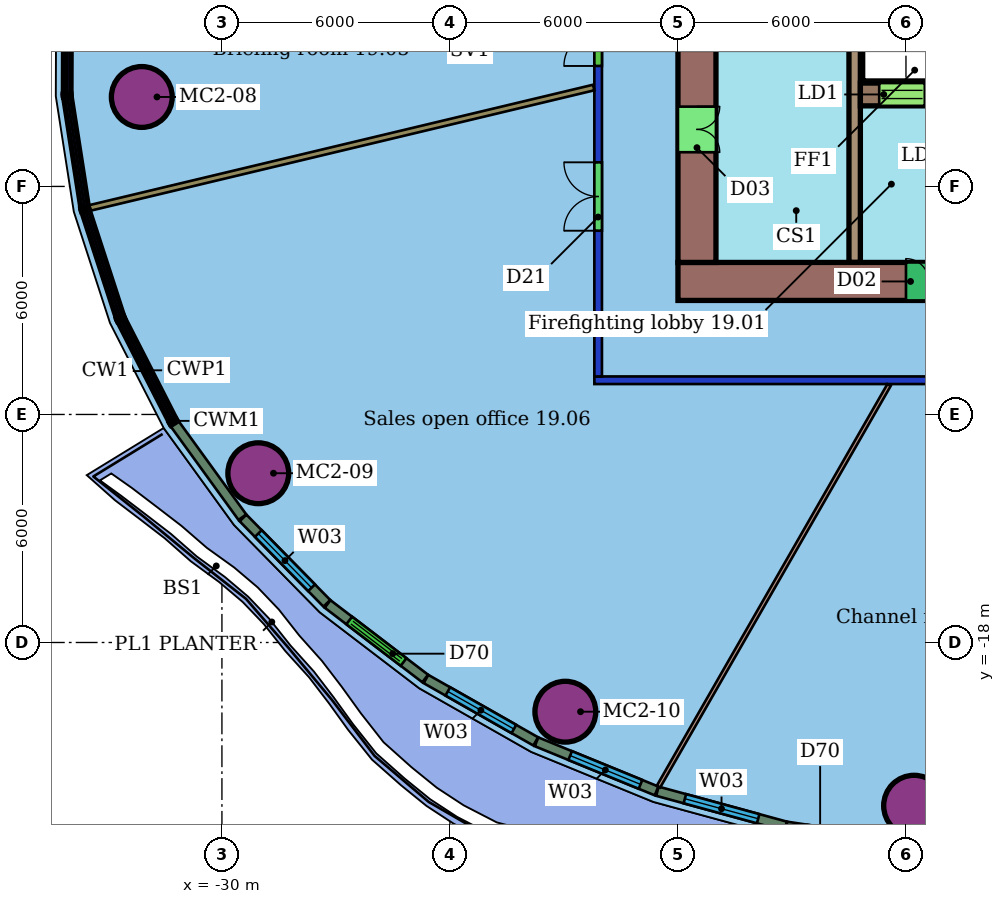
"""IFC4 building model, lengths in metres.
Left out: names, types, materials, properties, quantities, classifications, styles, units other than length and angle.
Written with IfcOpenShell. Run it as: python <this file> out.ifc"""

import sys

from ifc_helpers import new_model, si_unit, direction, frame, frame_2d, origin, origin_2d, place, context, subcontext, project, spatial, rectangle, hollow_circle, extrude, element, fill, save


model = new_model("IFC4")
c1 = context("Model", 3, precision=1e-05, world=origin(), true_north=direction((0.0, 1.0)))
c2 = subcontext(c1, "Body", "Model", "MODEL_VIEW")
j1 = project(units=[si_unit("LENGTHUNIT", "METRE"), si_unit("PLANEANGLEUNIT", "RADIAN")], contexts=[c1])
p1 = place(None, origin())
s1 = spatial("IfcSite", under=j1, at=p1, CompositionType="ELEMENT")
p2 = place(p1, origin())
s2 = spatial("IfcBuilding", under=s1, at=p2, CompositionType="ELEMENT")
p3 = place(p2, frame((0.0, 0.0, 88.6)))
s3 = spatial("IfcBuildingStorey", under=s2, at=p3, CompositionType="ELEMENT", Elevation=88.6)
for number, where, z_axis, x_axis in (
    (1, (-32.109, -3.646, 0.0), (0.0, 0.0, 1.0), (1.0, 0.0, 0.0)),
    (2, (-29.043, -13.547, 0.0), (0.0, 0.0, 1.0), (1.0, 0.0, 0.0)),
    (3, (-20.963, -19.821, 0.0), (0.0, 0.0, 1.0), (1.0, 0.0, 0.0)),
    (4, (-11.787, -22.294, 0.0), (0.0, 0.0, 1.0), (1.0, 0.0, 0.0)),
):
    element("IfcColumn", number, at=place(p3, frame(where, z_axis=z_axis, x_axis=x_axis)), inside=s3, PredefinedType="COLUMN", context=c2, shape_type="SweptSolid", body=[
        extrude(hollow_circle(Radius=0.8, WallThickness=0.055, at=origin_2d()), origin(), (0.0, 0.0, 1.0), 3.45),
    ])
p4 = place(p3, frame((8.2, -11.1, 0.0), z_axis=(0.0, 0.0, 1.0), x_axis=(-1.0, 0.0, 0.0)))
e5 = element("IfcWall", 5, at=p4, inside=s3, PredefinedType="PARTITIONING", context=c2, shape_type="SweptSolid", body=[
    extrude(rectangle(XDim=28.4, YDim=0.2, at=frame_2d((14.2, 0.0))), origin(), (0.0, 0.0, 1.0), 3.0),
])
p5 = place(p4, frame((17.581, 0.0, 0.0)))
e6 = element("IfcOpeningElement", 6, at=p5, cuts=e5, PredefinedType="OPENING", context=c2, shape_type="SweptSolid", body=[
    extrude(rectangle(XDim=1.0, YDim=2.1, at=frame_2d((0.5, 1.05))), frame((0.0, 0.11, 0.0), z_axis=(0.0, -1.0, 0.0), x_axis=(1.0, 0.0, 0.0)), (0.0, 0.0, 1.0), 0.22),
])
p6 = place(p4, frame((6.998, 0.0, 0.0)))
e7 = element("IfcOpeningElement", 7, at=p6, cuts=e5, PredefinedType="OPENING", context=c2, shape_type="SweptSolid", body=[
    extrude(rectangle(XDim=1.5, YDim=2.1, at=frame_2d((0.75, 1.05))), frame((0.0, 0.11, 0.0), z_axis=(0.0, -1.0, 0.0), x_axis=(1.0, 0.0, 0.0)), (0.0, 0.0, 1.0), 0.22),
])
p7 = place(p4, frame((2.403, 0.0, 0.0)))
e8 = element("IfcOpeningElement", 8, at=p7, cuts=e5, PredefinedType="OPENING", context=c2, shape_type="SweptSolid", body=[
    extrude(rectangle(XDim=1.0, YDim=2.4, at=frame_2d((0.5, 1.2))), frame((0.0, 0.11, 0.0), z_axis=(0.0, -1.0, 0.0), x_axis=(1.0, 0.0, 0.0)), (0.0, 0.0, 1.0), 0.22),
])
p8 = place(p3, frame((-20.1, -11.0, 0.0), z_axis=(0.0, 0.0, 1.0), x_axis=(0.0, 1.0, 0.0)))
e9 = element("IfcWall", 9, at=p8, inside=s3, PredefinedType="PARTITIONING", context=c2, shape_type="SweptSolid", body=[
    extrude(rectangle(XDim=22.0, YDim=0.2, at=frame_2d((11.0, 0.0))), origin(), (0.0, 0.0, 1.0), 3.0),
])
p9 = place(p8, frame((14.9, 0.0, 0.0)))
e10 = element("IfcOpeningElement", 10, at=p9, cuts=e9, PredefinedType="OPENING", context=c2, shape_type="SweptSolid", body=[
    extrude(rectangle(XDim=0.9, YDim=2.1, at=frame_2d((0.45, 1.05))), frame((0.0, 0.11, 0.0), z_axis=(0.0, -1.0, 0.0), x_axis=(1.0, 0.0, 0.0)), (0.0, 0.0, 1.0), 0.22),
])
p10 = place(p8, frame((8.17, 0.0, 0.0)))
e11 = element("IfcOpeningElement", 11, at=p10, cuts=e9, PredefinedType="OPENING", context=c2, shape_type="SweptSolid", body=[
    extrude(rectangle(XDim=1.8, YDim=2.4, at=frame_2d((0.9, 1.2))), frame((0.0, 0.11, 0.0), z_axis=(0.0, -1.0, 0.0), x_axis=(1.0, 0.0, 0.0)), (0.0, 0.0, 1.0), 0.22),
])
p11 = place(p8, frame((3.835, 0.0, 0.0)))
e12 = element("IfcOpeningElement", 12, at=p11, cuts=e9, PredefinedType="OPENING", context=c2, shape_type="SweptSolid", body=[
    extrude(rectangle(XDim=1.8, YDim=2.1, at=frame_2d((0.9, 1.05))), frame((0.0, 0.11, 0.0), z_axis=(0.0, -1.0, 0.0), x_axis=(1.0, 0.0, 0.0)), (0.0, 0.0, 1.0), 0.22),
])
p12 = place(p3, frame((-33.484, -6.568, 0.0), z_axis=(0.0, 0.0, 1.0), x_axis=(0.972610744355, 0.232439970669, 0.0)))
e13 = element("IfcWall", 13, at=p12, inside=s3, PredefinedType="PARTITIONING", context=c2, shape_type="SweptSolid", body=[
    extrude(rectangle(XDim=13.64, YDim=0.15, at=frame_2d((6.82, 0.0))), origin(), (0.0, 0.0, 1.0), 3.45),
])
p13 = place(p3, frame((-18.512, -21.792, 0.0), z_axis=(0.0, 0.0, 1.0), x_axis=(0.497918029238, 0.867224098004, 0.0)))
e14 = element("IfcWall", 14, at=p13, inside=s3, PredefinedType="PARTITIONING", context=c2, shape_type="SweptSolid", body=[
    extrude(rectangle(XDim=12.185, YDim=0.1, at=frame_2d((6.093, 0.0))), origin(), (0.0, 0.0, 1.0), 3.45),
])
p14 = place(p3, frame((-31.245, -12.244, 0.0), z_axis=(0.0, 0.0, 1.0), x_axis=(0.586957033691, -0.809618083173, 0.0)))
e15 = element("IfcWall", 15, at=p14, inside=s3, PredefinedType="SOLIDWALL", context=c2, shape_type="SweptSolid", body=[
    extrude(rectangle(XDim=3.037, YDim=0.25, at=frame_2d((1.519, 0.0))), origin(), (0.0, 0.0, 1.0), 3.05),
])
p15 = place(p3, frame((-29.445, -14.723, 0.0), z_axis=(0.0, 0.0, 1.0), x_axis=(0.700641049886, -0.71351392363, 0.0)))
e16 = element("IfcWall", 16, at=p15, inside=s3, PredefinedType="SOLIDWALL", context=c2, shape_type="SweptSolid", body=[
    extrude(rectangle(XDim=3.148, YDim=0.25, at=frame_2d((1.574, 0.0))), origin(), (0.0, 0.0, 1.0), 3.05),
])
p16 = place(p15, frame((0.574, 0.0, 0.9)))
e17 = element("IfcOpeningElement", 17, at=p16, cuts=e16, PredefinedType="OPENING", context=c2, shape_type="SweptSolid", body=[
    extrude(rectangle(XDim=2.0, YDim=2.1, at=frame_2d((1.0, 1.05))), frame((0.0, 0.135, 0.0), z_axis=(0.0, -1.0, 0.0), x_axis=(1.0, 0.0, 0.0)), (0.0, 0.0, 1.0), 0.27),
])
p17 = place(p3, frame((-27.219, -16.986, 0.0), z_axis=(0.0, 0.0, 1.0), x_axis=(0.794820819691, -0.606844184768, 0.0)))
e18 = element("IfcWall", 18, at=p17, inside=s3, PredefinedType="SOLIDWALL", context=c2, shape_type="SweptSolid", body=[
    extrude(rectangle(XDim=3.231, YDim=0.25, at=frame_2d((1.616, 0.0))), origin(), (0.0, 0.0, 1.0), 3.05),
])
p18 = place(p17, frame((0.716, 0.0, 0.0)))
e19 = element("IfcOpeningElement", 19, at=p18, cuts=e18, PredefinedType="OPENING", context=c2, shape_type="SweptSolid", body=[
    extrude(rectangle(XDim=1.8, YDim=2.4, at=frame_2d((0.9, 1.2))), frame((0.0, 0.135, 0.0), z_axis=(0.0, -1.0, 0.0), x_axis=(1.0, 0.0, 0.0)), (0.0, 0.0, 1.0), 0.27),
])
p19 = place(p3, frame((-24.63, -18.961, 0.0), z_axis=(0.0, 0.0, 1.0), x_axis=(0.869344607867, -0.494206386819, 0.0)))
e20 = element("IfcWall", 20, at=p19, inside=s3, PredefinedType="SOLIDWALL", context=c2, shape_type="SweptSolid", body=[
    extrude(rectangle(XDim=3.322, YDim=0.25, at=frame_2d((1.661, 0.0))), origin(), (0.0, 0.0, 1.0), 3.05),
])
p20 = place(p19, frame((0.661, 0.0, 0.9)))
e21 = element("IfcOpeningElement", 21, at=p20, cuts=e20, PredefinedType="OPENING", context=c2, shape_type="SweptSolid", body=[
    extrude(rectangle(XDim=2.0, YDim=2.1, at=frame_2d((1.0, 1.05))), frame((0.0, 0.135, 0.0), z_axis=(0.0, -1.0, 0.0), x_axis=(1.0, 0.0, 0.0)), (0.0, 0.0, 1.0), 0.27),
])
p21 = place(p3, frame((-21.721, -20.613, 0.0), z_axis=(0.0, 0.0, 1.0), x_axis=(0.925471723518, -0.378816695735, 0.0)))
e22 = element("IfcWall", 22, at=p21, inside=s3, PredefinedType="SOLIDWALL", context=c2, shape_type="SweptSolid", body=[
    extrude(rectangle(XDim=3.413, YDim=0.25, at=frame_2d((1.706, 0.0))), origin(), (0.0, 0.0, 1.0), 3.05),
])
p22 = place(p21, frame((0.956, 0.0, 0.9)))
e23 = element("IfcOpeningElement", 23, at=p22, cuts=e22, PredefinedType="OPENING", context=c2, shape_type="SweptSolid", body=[
    extrude(rectangle(XDim=2.0, YDim=2.1, at=frame_2d((1.0, 1.05))), frame((0.0, 0.135, 0.0), z_axis=(0.0, -1.0, 0.0), x_axis=(1.0, 0.0, 0.0)), (0.0, 0.0, 1.0), 0.27),
])
p23 = place(p3, frame((-18.541, -21.913, 0.0), z_axis=(0.0, 0.0, 1.0), x_axis=(0.964717093179, -0.263288682112, 0.0)))
e24 = element("IfcWall", 24, at=p23, inside=s3, PredefinedType="SOLIDWALL", context=c2, shape_type="SweptSolid", body=[
    extrude(rectangle(XDim=3.498, YDim=0.25, at=frame_2d((1.749, 0.0))), origin(), (0.0, 0.0, 1.0), 3.05),
])
p24 = place(p23, frame((0.749, 0.0, 0.9)))
e25 = element("IfcOpeningElement", 25, at=p24, cuts=e24, PredefinedType="OPENING", context=c2, shape_type="SweptSolid", body=[
    extrude(rectangle(XDim=2.0, YDim=2.1, at=frame_2d((1.0, 1.05))), frame((0.0, 0.135, 0.0), z_axis=(0.0, -1.0, 0.0), x_axis=(1.0, 0.0, 0.0)), (0.0, 0.0, 1.0), 0.27),
])
p25 = place(p3, frame((-15.145, -22.839, 0.0), z_axis=(0.0, 0.0, 1.0), x_axis=(0.988850976046, -0.148908519475, 0.0)))
e26 = element("IfcWall", 26, at=p25, inside=s3, PredefinedType="SOLIDWALL", context=c2, shape_type="SweptSolid", body=[
    extrude(rectangle(XDim=3.573, YDim=0.25, at=frame_2d((1.786, 0.0))), origin(), (0.0, 0.0, 1.0), 3.05),
])
p26 = place(p25, frame((0.536, 0.0, 0.0)))
e27 = element("IfcOpeningElement", 27, at=p26, cuts=e26, PredefinedType="OPENING", context=c2, shape_type="SweptSolid", body=[
    extrude(rectangle(XDim=1.8, YDim=2.4, at=frame_2d((0.9, 1.2))), frame((0.0, 0.135, 0.0), z_axis=(0.0, -1.0, 0.0), x_axis=(1.0, 0.0, 0.0)), (0.0, 0.0, 1.0), 0.27),
])
p27 = place(p3, frame((-18.0, -8.5, 0.0), z_axis=(0.0, 0.0, 1.0), x_axis=(1.0, 0.0, 0.0)))
e28 = element("IfcWall", 28, at=p27, inside=s3, PredefinedType="SHEAR", context=c2, shape_type="SweptSolid", body=[
    extrude(rectangle(XDim=24.0, YDim=1.0, at=frame_2d((12.0, 0.0))), origin(), (0.0, 0.0, 1.0), 3.3),
])
p28 = place(p27, frame((6.0, 0.0, 0.0)))
e29 = element("IfcOpeningElement", 29, at=p28, cuts=e28, PredefinedType="OPENING", context=c2, shape_type="SweptSolid", body=[
    extrude(rectangle(XDim=1.2, YDim=2.1, at=frame_2d((0.6, 1.05))), frame((0.0, 0.51, 0.0), z_axis=(0.0, -1.0, 0.0), x_axis=(1.0, 0.0, 0.0)), (0.0, 0.0, 1.0), 1.02),
])
p29 = place(p3, frame((-17.5, 8.0, 0.0), z_axis=(0.0, 0.0, 1.0), x_axis=(0.0, -1.0, 0.0)))
e30 = element("IfcWall", 30, at=p29, inside=s3, PredefinedType="SHEAR", context=c2, shape_type="SweptSolid", body=[
    extrude(rectangle(XDim=16.0, YDim=1.0, at=frame_2d((8.0, 0.0))), origin(), (0.0, 0.0, 1.0), 3.3),
])
p30 = place(p29, frame((11.9, 0.0, 0.0)))
e31 = element("IfcOpeningElement", 31, at=p30, cuts=e30, PredefinedType="OPENING", context=c2, shape_type="SweptSolid", body=[
    extrude(rectangle(XDim=1.2, YDim=2.1, at=frame_2d((0.6, 1.05))), frame((0.0, 0.51, 0.0), z_axis=(0.0, -1.0, 0.0), x_axis=(1.0, 0.0, 0.0)), (0.0, 0.0, 1.0), 1.02),
])
p31 = place(p29, frame((2.9, 0.0, 0.0)))
e32 = element("IfcOpeningElement", 32, at=p31, cuts=e30, PredefinedType="OPENING", context=c2, shape_type="SweptSolid", body=[
    extrude(rectangle(XDim=1.2, YDim=2.1, at=frame_2d((0.6, 1.05))), frame((0.0, 0.51, 0.0), z_axis=(0.0, -1.0, 0.0), x_axis=(1.0, 0.0, 0.0)), (0.0, 0.0, 1.0), 1.02),
])
p32 = place(p3, frame((-13.2, -3.58, 0.0), z_axis=(0.0, 0.0, 1.0), x_axis=(1.0, 0.0, 0.0)))
e33 = element("IfcWall", 33, at=p32, inside=s3, PredefinedType="SHEAR", context=c2, shape_type="SweptSolid", body=[
    extrude(rectangle(XDim=7.2, YDim=0.6, at=frame_2d((3.6, 0.0))), origin(), (0.0, 0.0, 1.0), 3.3),
])
p33 = place(p32, frame((0.496, 0.0, 0.0)))
e34 = element("IfcOpeningElement", 34, at=p33, cuts=e33, PredefinedType="OPENING", context=c2, shape_type="SweptSolid", body=[
    extrude(rectangle(XDim=1.2, YDim=2.1, at=frame_2d((0.6, 1.05))), frame((0.0, 0.31, 0.0), z_axis=(0.0, -1.0, 0.0), x_axis=(1.0, 0.0, 0.0)), (0.0, 0.0, 1.0), 0.62),
])
p34 = place(p32, frame((2.938, 0.0, 0.0)))
e35 = element("IfcOpeningElement", 35, at=p34, cuts=e33, PredefinedType="OPENING", context=c2, shape_type="SweptSolid", body=[
    extrude(rectangle(XDim=1.2, YDim=2.1, at=frame_2d((0.6, 1.05))), frame((0.0, 0.31, 0.0), z_axis=(0.0, -1.0, 0.0), x_axis=(1.0, 0.0, 0.0)), (0.0, 0.0, 1.0), 0.62),
])
p35 = place(p3, frame((-13.35, 8.0, 0.0), z_axis=(0.0, 0.0, 1.0), x_axis=(0.0, -1.0, 0.0)))
e36 = element("IfcWall", 36, at=p35, inside=s3, PredefinedType="SHEAR", context=c2, shape_type="SweptSolid", body=[
    extrude(rectangle(XDim=16.0, YDim=0.3, at=frame_2d((8.0, 0.0))), origin(), (0.0, 0.0, 1.0), 3.3),
])
p36 = place(p35, frame((7.25, 0.0, 0.0)))
e37 = element("IfcOpeningElement", 37, at=p36, cuts=e36, PredefinedType="OPENING", context=c2, shape_type="SweptSolid", body=[
    extrude(rectangle(XDim=1.5, YDim=2.1, at=frame_2d((0.75, 1.05))), frame((0.0, 0.16, 0.0), z_axis=(0.0, -1.0, 0.0), x_axis=(1.0, 0.0, 0.0)), (0.0, 0.0, 1.0), 0.32),
])
p37 = place(p10, origin())
e38 = element("IfcDoor", 38, at=p37, inside=s3, OperationType="DOUBLE_DOOR_SINGLE_SWING", PredefinedType="DOOR", context=c2, shape_type="SweptSolid", body=[
    extrude(rectangle(XDim=1.8, YDim=2.4, at=frame_2d((0.9, 1.2))), frame((0.0, 0.025, 0.0), z_axis=(0.0, -1.0, 0.0), x_axis=(1.0, 0.0, 0.0)), (0.0, 0.0, 1.0), 0.05),
])
fill(e11, e38)
p38 = place(p11, origin())
e39 = element("IfcDoor", 39, at=p38, inside=s3, OperationType="DOUBLE_DOOR_SINGLE_SWING", PredefinedType="DOOR", context=c2, shape_type="SweptSolid", body=[
    extrude(rectangle(XDim=1.8, YDim=2.1, at=frame_2d((0.9, 1.05))), frame((0.0, 0.025, 0.0), z_axis=(0.0, -1.0, 0.0), x_axis=(1.0, 0.0, 0.0)), (0.0, 0.0, 1.0), 0.05),
])
fill(e12, e39)
p39 = place(p16, origin())
e40 = element("IfcWindow", 40, at=p39, inside=s3, PartitioningType="SINGLE_PANEL", PredefinedType="WINDOW", context=c2, shape_type="SweptSolid", body=[
    extrude(rectangle(XDim=2.0, YDim=2.1, at=frame_2d((1.0, 1.05))), frame((0.0, 0.03, 0.0), z_axis=(0.0, -1.0, 0.0), x_axis=(1.0, 0.0, 0.0)), (0.0, 0.0, 1.0), 0.06),
])
fill(e17, e40)
p40 = place(p18, origin())
e41 = element("IfcDoor", 41, at=p40, inside=s3, OperationType="DOUBLE_DOOR_SLIDING", PredefinedType="DOOR", context=c2, shape_type="SweptSolid", body=[
    extrude(rectangle(XDim=1.8, YDim=2.4, at=frame_2d((0.9, 1.2))), frame((0.0, 0.025, 0.0), z_axis=(0.0, -1.0, 0.0), x_axis=(1.0, 0.0, 0.0)), (0.0, 0.0, 1.0), 0.05),
])
fill(e19, e41)
p41 = place(p20, origin())
e42 = element("IfcWindow", 42, at=p41, inside=s3, PartitioningType="SINGLE_PANEL", PredefinedType="WINDOW", context=c2, shape_type="SweptSolid", body=[
    extrude(rectangle(XDim=2.0, YDim=2.1, at=frame_2d((1.0, 1.05))), frame((0.0, 0.03, 0.0), z_axis=(0.0, -1.0, 0.0), x_axis=(1.0, 0.0, 0.0)), (0.0, 0.0, 1.0), 0.06),
])
fill(e21, e42)
p42 = place(p22, origin())
e43 = element("IfcWindow", 43, at=p42, inside=s3, PartitioningType="SINGLE_PANEL", PredefinedType="WINDOW", context=c2, shape_type="SweptSolid", body=[
    extrude(rectangle(XDim=2.0, YDim=2.1, at=frame_2d((1.0, 1.05))), frame((0.0, 0.03, 0.0), z_axis=(0.0, -1.0, 0.0), x_axis=(1.0, 0.0, 0.0)), (0.0, 0.0, 1.0), 0.06),
])
fill(e23, e43)
p43 = place(p24, origin())
e44 = element("IfcWindow", 44, at=p43, inside=s3, PartitioningType="SINGLE_PANEL", PredefinedType="WINDOW", context=c2, shape_type="SweptSolid", body=[
    extrude(rectangle(XDim=2.0, YDim=2.1, at=frame_2d((1.0, 1.05))), frame((0.0, 0.03, 0.0), z_axis=(0.0, -1.0, 0.0), x_axis=(1.0, 0.0, 0.0)), (0.0, 0.0, 1.0), 0.06),
])
fill(e25, e44)
p44 = place(p28, origin())
e45 = element("IfcDoor", 45, at=p44, inside=s3, OperationType="DOUBLE_DOOR_SINGLE_SWING", PredefinedType="NOTDEFINED", context=c2, shape_type="SweptSolid", body=[
    extrude(rectangle(XDim=1.2, YDim=2.1, at=frame_2d((0.6, 1.05))), frame((0.0, 0.025, 0.0), z_axis=(0.0, -1.0, 0.0), x_axis=(1.0, 0.0, 0.0)), (0.0, 0.0, 1.0), 0.05),
])
fill(e29, e45)
p45 = place(p30, origin())
e46 = element("IfcDoor", 46, at=p45, inside=s3, OperationType="DOUBLE_DOOR_SINGLE_SWING", PredefinedType="NOTDEFINED", context=c2, shape_type="SweptSolid", body=[
    extrude(rectangle(XDim=1.2, YDim=2.1, at=frame_2d((0.6, 1.05))), frame((0.0, 0.025, 0.0), z_axis=(0.0, -1.0, 0.0), x_axis=(1.0, 0.0, 0.0)), (0.0, 0.0, 1.0), 0.05),
])
fill(e31, e46)
p46 = place(p33, origin())
e47 = element("IfcDoor", 47, at=p46, inside=s3, OperationType="DOUBLE_DOOR_SLIDING", PredefinedType="NOTDEFINED", context=c2, shape_type="SweptSolid", body=[
    extrude(rectangle(XDim=1.2, YDim=2.1, at=frame_2d((0.6, 1.05))), frame((0.0, 0.025, 0.0), z_axis=(0.0, -1.0, 0.0), x_axis=(1.0, 0.0, 0.0)), (0.0, 0.0, 1.0), 0.05),
])
fill(e34, e47)
save(model, sys.argv[1])
